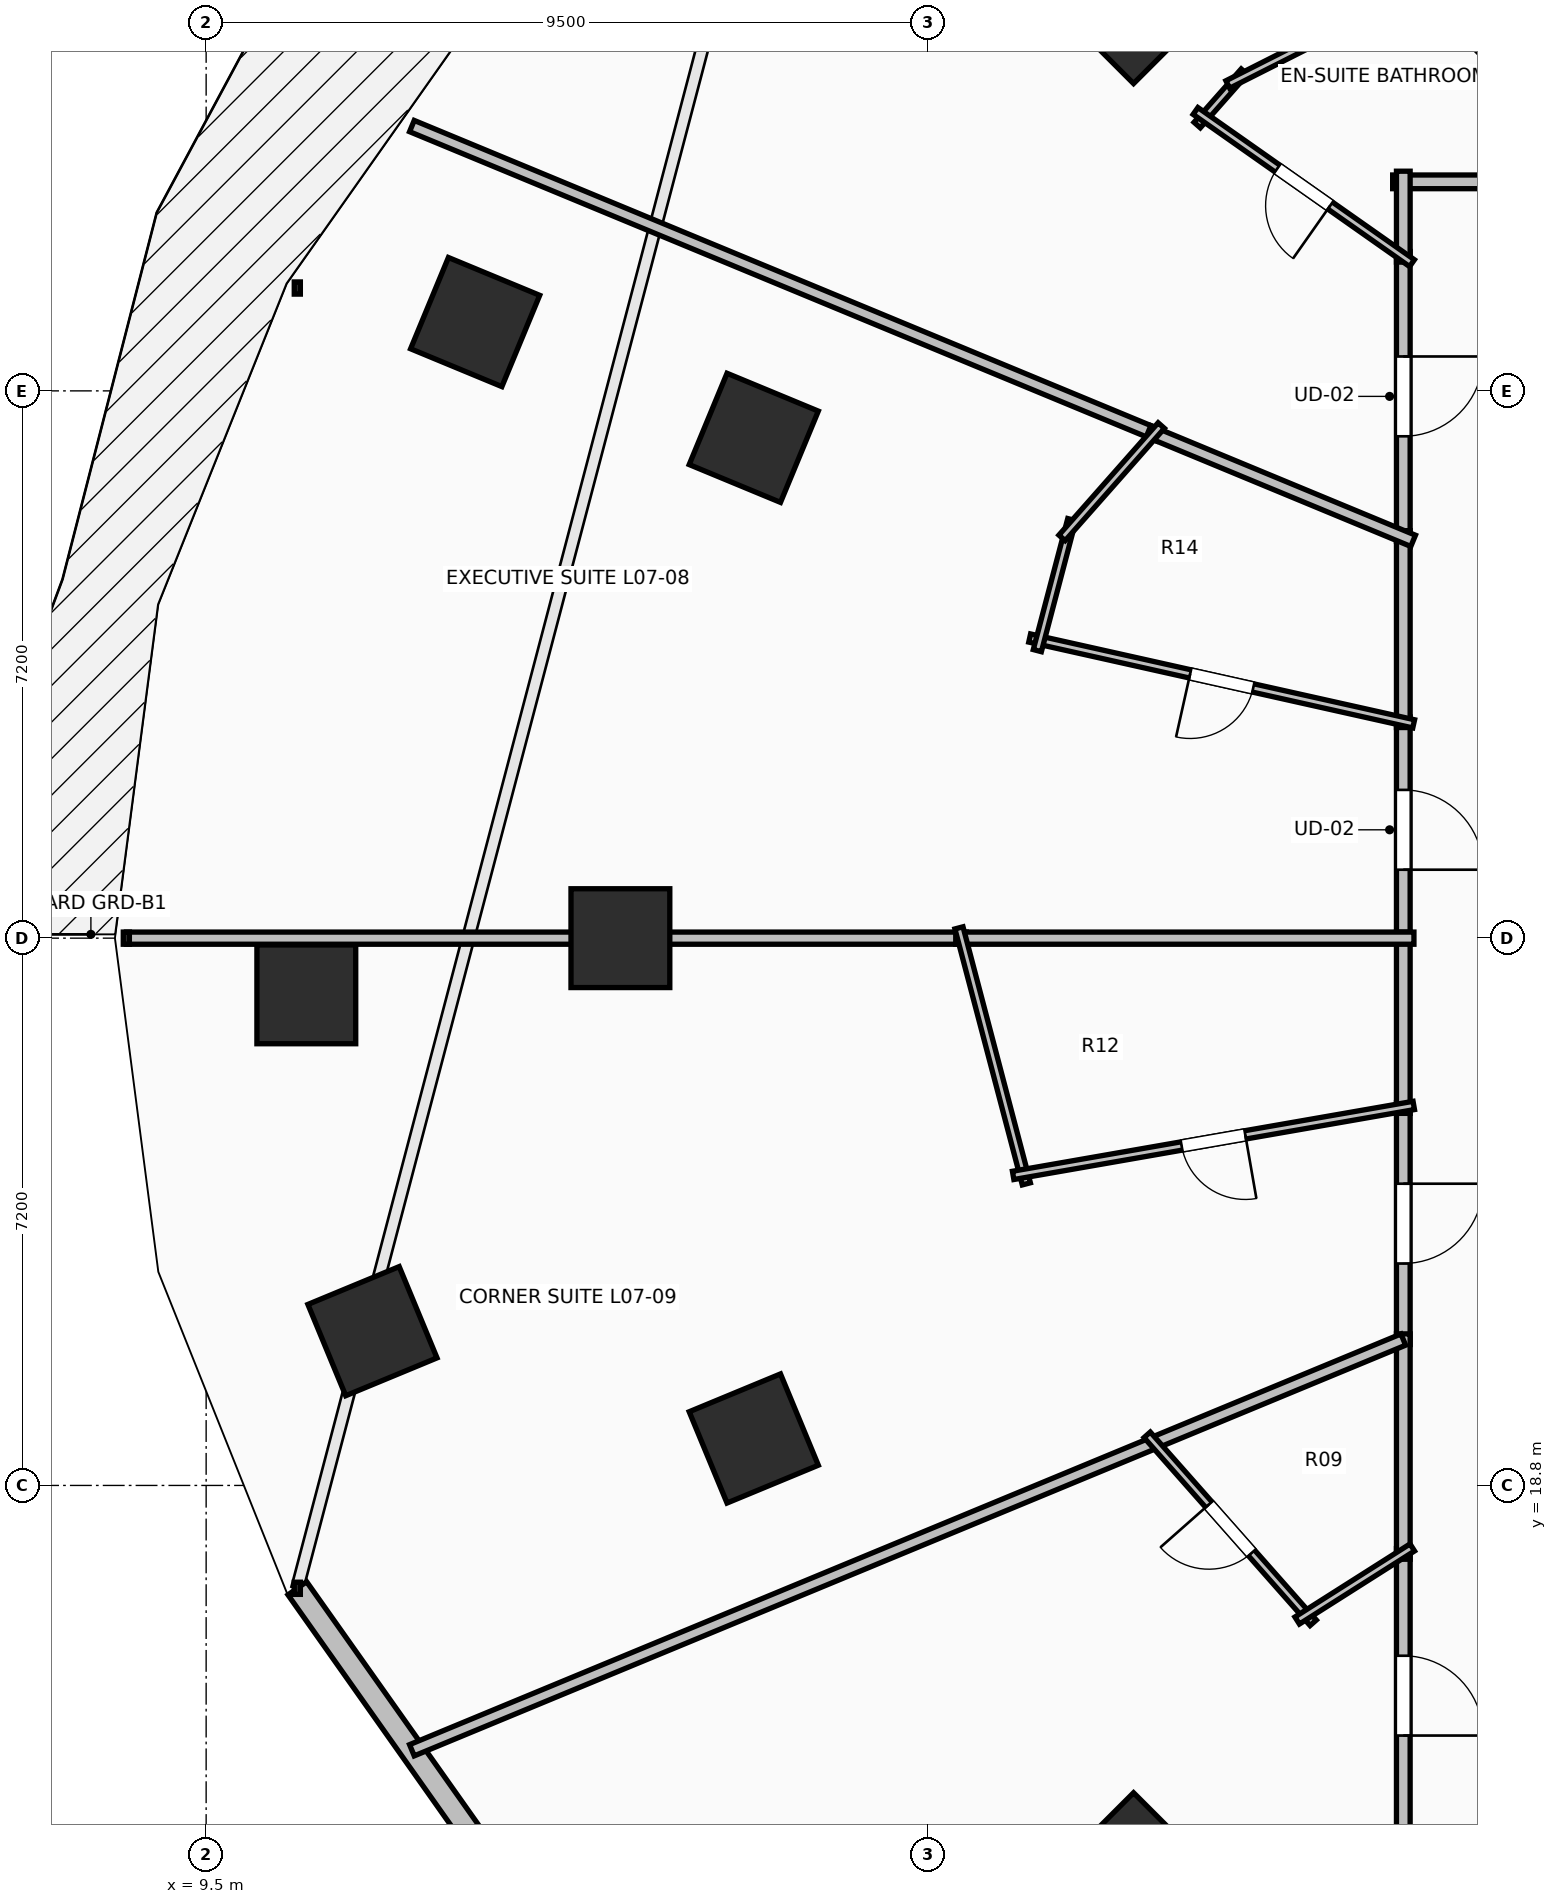
"""IFC4 building model, lengths in metres.
Left out: names, types, materials, properties, quantities, classifications, styles, units other than length and angle.
Written with IfcOpenShell. Run it as: python <this file> out.ifc"""

import sys

from ifc_helpers import new_model, si_unit, direction, frame, frame_2d, origin, origin_2d, place, context, subcontext, project, spatial, rectangle, extrude, element, fill, save


model = new_model("IFC4")
c1 = context("Model", 3, precision=1e-05, world=origin(), true_north=direction((0.0, 1.0)))
c2 = subcontext(c1, "Body", "Model", "MODEL_VIEW")
j1 = project(units=[si_unit("LENGTHUNIT", "METRE"), si_unit("PLANEANGLEUNIT", "RADIAN")], contexts=[c1])
p1 = place(None, origin())
s1 = spatial("IfcSite", under=j1, at=p1, CompositionType="ELEMENT")
p2 = place(p1, origin())
s2 = spatial("IfcBuilding", under=s1, at=p2, CompositionType="ELEMENT")
p3 = place(p2, frame((0.0, 0.0, 31.0)))
s3 = spatial("IfcBuildingStorey", under=s2, at=p3, CompositionType="ELEMENT", Elevation=31.0)
for number, where, z_axis, x_axis in (
    (1, (21.701, 38.162, 0.0), (0.0, 0.0, 1.0), (-0.707, 0.707, 0.0)),
    (2, (16.705, 32.582, 0.0), (0.0, 0.0, 1.0), (-0.924, 0.383, 0.0)),
    (3, (14.95, 26.0, 0.0), (0.0, 0.0, 1.0), (-1.0, 0.0, 0.0)),
    (4, (16.705, 19.418, 0.0), (0.0, 0.0, 1.0), (-0.924, -0.383, 0.0)),
    (5, (21.701, 13.838, 0.0), (0.0, 0.0, 1.0), (-0.707, -0.707, 0.0)),
    (6, (13.039, 34.105, 0.0), (0.0, 0.0, 1.0), (-0.924, 0.383, 0.0)),
    (7, (10.818, 25.261, 0.0), (0.0, 0.0, 1.0), (-1.0, 0.0, 0.0)),
    (8, (11.688, 20.83, 0.0), (0.0, 0.0, 1.0), (-0.924, -0.383, 0.0)),
):
    element("IfcColumn", number, at=place(p3, frame(where, z_axis=z_axis, x_axis=x_axis)), inside=s3, PredefinedType="COLUMN", context=c2, shape_type="SweptSolid", body=[
        extrude(rectangle(XDim=1.3, YDim=1.3, at=origin_2d()), origin(), (0.0, 0.0, 1.0), 3.5),
    ])
p4 = place(p3, frame((10.699, 17.447, 0.0), z_axis=(0.0, 0.0, 1.0), x_axis=(0.577130815624, -0.816651713803, 0.0)))
e9 = element("IfcWall", 9, at=p4, inside=s3, PredefinedType="STANDARD", context=c2, shape_type="SweptSolid", body=[
    extrude(rectangle(XDim=4.731, YDim=0.3, at=frame_2d((2.366, 0.0))), origin(), (0.0, 0.0, 1.0), 3.24),
])
p5 = place(p3, frame((25.25, 35.034, 0.0), z_axis=(0.0, 0.0, 1.0), x_axis=(0.0, -1.0, 0.0)))
e10 = element("IfcWall", 10, at=p5, inside=s3, PredefinedType="PARTITIONING", context=c2, shape_type="SweptSolid", body=[
    extrude(rectangle(XDim=3.813, YDim=0.18, at=frame_2d((1.906, 0.0))), origin(), (0.0, 0.0, 1.0), 2.432),
])
p6 = place(p5, frame((1.382, 0.0, 0.0)))
e11 = element("IfcOpeningElement", 11, at=p6, cuts=e10, PredefinedType="OPENING", context=c2, shape_type="SweptSolid", body=[
    extrude(rectangle(XDim=1.05, YDim=2.2, at=frame_2d((0.525, 1.1))), frame((0.0, 0.105, 0.0), z_axis=(0.0, -1.0, 0.0), x_axis=(1.0, 0.0, 0.0)), (0.0, 0.0, 1.0), 0.21),
])
p7 = place(p3, frame((28.105, 35.95, 0.0), z_axis=(0.0, 0.0, 1.0), x_axis=(-1.0, 0.0, 0.0)))
e12 = element("IfcWall", 12, at=p7, inside=s3, PredefinedType="PARTITIONING", context=c2, shape_type="SweptSolid", body=[
    extrude(rectangle(XDim=2.995, YDim=0.18, at=frame_2d((1.498, 0.0))), origin(), (0.0, 0.0, 1.0), 2.432),
])
p8 = place(p3, frame((25.25, 36.09, 0.0), z_axis=(0.0, 0.0, 1.0), x_axis=(0.0, -1.0, 0.0)))
e13 = element("IfcWall", 13, at=p8, inside=s3, PredefinedType="PARTITIONING", context=c2, shape_type="SweptSolid", body=[
    extrude(rectangle(XDim=1.196, YDim=0.18, at=frame_2d((0.598, 0.0))), origin(), (0.0, 0.0, 1.0), 2.432),
])
p9 = place(p3, frame((25.25, 28.911, 0.0), z_axis=(0.0, 0.0, 1.0), x_axis=(0.0, -1.0, 0.0)))
e14 = element("IfcWall", 14, at=p9, inside=s3, PredefinedType="PARTITIONING", context=c2, shape_type="SweptSolid", body=[
    extrude(rectangle(XDim=2.971, YDim=0.18, at=frame_2d((1.485, 0.0))), origin(), (0.0, 0.0, 1.0), 2.432),
])
p10 = place(p9, frame((0.96, 0.0, 0.0)))
e15 = element("IfcOpeningElement", 15, at=p10, cuts=e14, PredefinedType="OPENING", context=c2, shape_type="SweptSolid", body=[
    extrude(rectangle(XDim=1.05, YDim=2.2, at=frame_2d((0.525, 1.1))), frame((0.0, 0.105, 0.0), z_axis=(0.0, -1.0, 0.0), x_axis=(1.0, 0.0, 0.0)), (0.0, 0.0, 1.0), 0.21),
])
p11 = place(p3, frame((25.25, 31.361, 0.0), z_axis=(0.0, 0.0, 1.0), x_axis=(0.0, -1.0, 0.0)))
e16 = element("IfcWall", 16, at=p11, inside=s3, PredefinedType="PARTITIONING", context=c2, shape_type="SweptSolid", body=[
    extrude(rectangle(XDim=2.59, YDim=0.18, at=frame_2d((1.295, 0.0))), origin(), (0.0, 0.0, 1.0), 2.432),
])
p12 = place(p3, frame((25.25, 23.835, 0.0), z_axis=(0.0, 0.0, 1.0), x_axis=(0.0, -1.0, 0.0)))
e17 = element("IfcWall", 17, at=p12, inside=s3, PredefinedType="PARTITIONING", context=c2, shape_type="SweptSolid", body=[
    extrude(rectangle(XDim=3.181, YDim=0.18, at=frame_2d((1.59, 0.0))), origin(), (0.0, 0.0, 1.0), 3.24),
])
p13 = place(p12, frame((1.065, 0.0, 0.0)))
e18 = element("IfcOpeningElement", 18, at=p13, cuts=e17, PredefinedType="OPENING", context=c2, shape_type="SweptSolid", body=[
    extrude(rectangle(XDim=1.05, YDim=2.2, at=frame_2d((0.525, 1.1))), frame((0.0, 0.105, 0.0), z_axis=(0.0, -1.0, 0.0), x_axis=(1.0, 0.0, 0.0)), (0.0, 0.0, 1.0), 0.21),
])
p14 = place(p3, frame((25.25, 26.08, 0.0), z_axis=(0.0, 0.0, 1.0), x_axis=(0.0, -1.0, 0.0)))
e19 = element("IfcWall", 19, at=p14, inside=s3, PredefinedType="PARTITIONING", context=c2, shape_type="SweptSolid", body=[
    extrude(rectangle(XDim=2.385, YDim=0.18, at=frame_2d((1.192, 0.0))), origin(), (0.0, 0.0, 1.0), 3.24),
])
p15 = place(p3, frame((25.25, 17.969, 0.0), z_axis=(0.0, 0.0, 1.0), x_axis=(0.0, -1.0, 0.0)))
e20 = element("IfcWall", 20, at=p15, inside=s3, PredefinedType="PARTITIONING", context=c2, shape_type="SweptSolid", body=[
    extrude(rectangle(XDim=3.869, YDim=0.18, at=frame_2d((1.935, 0.0))), origin(), (0.0, 0.0, 1.0), 2.432),
])
p16 = place(p15, frame((1.409, 0.0, 0.0)))
e21 = element("IfcOpeningElement", 21, at=p16, cuts=e20, PredefinedType="OPENING", context=c2, shape_type="SweptSolid", body=[
    extrude(rectangle(XDim=1.05, YDim=2.2, at=frame_2d((0.525, 1.1))), frame((0.0, 0.105, 0.0), z_axis=(0.0, -1.0, 0.0), x_axis=(1.0, 0.0, 0.0)), (0.0, 0.0, 1.0), 0.21),
])
p17 = place(p3, frame((25.25, 20.794, 0.0), z_axis=(0.0, 0.0, 1.0), x_axis=(0.0, -1.0, 0.0)))
e22 = element("IfcWall", 22, at=p17, inside=s3, PredefinedType="PARTITIONING", context=c2, shape_type="SweptSolid", body=[
    extrude(rectangle(XDim=2.965, YDim=0.18, at=frame_2d((1.482, 0.0))), origin(), (0.0, 0.0, 1.0), 3.24),
])
p18 = place(p3, frame((20.247, 43.753, 0.0), z_axis=(0.0, 0.0, 1.0), x_axis=(0.707106781187, -0.707106781187, 0.0)))
e23 = element("IfcWall", 23, at=p18, inside=s3, PredefinedType="PARTITIONING", context=c2, shape_type="SweptSolid", body=[
    extrude(rectangle(XDim=11.035, YDim=0.16, at=frame_2d((5.518, 0.0))), origin(), (0.0, 0.0, 1.0), 2.432),
])
p19 = place(p3, frame((22.538, 36.697, 0.0), z_axis=(0.0, 0.0, 1.0), x_axis=(0.662242037053, 0.749289986827, 0.0)))
e24 = element("IfcWall", 24, at=p19, inside=s3, PredefinedType="PARTITIONING", context=c2, shape_type="SweptSolid", body=[
    extrude(rectangle(XDim=0.937, YDim=0.11, at=frame_2d((0.468, 0.0))), origin(), (0.0, 0.0, 1.0), 2.432),
])
p20 = place(p3, frame((22.941, 37.231, 0.0), z_axis=(0.0, 0.0, 1.0), x_axis=(0.892507731149, 0.451032094024, 0.0)))
e25 = element("IfcWall", 25, at=p20, inside=s3, PredefinedType="PARTITIONING", context=c2, shape_type="SweptSolid", body=[
    extrude(rectangle(XDim=2.989, YDim=0.11, at=frame_2d((1.495, 0.0))), origin(), (0.0, 0.0, 1.0), 2.432),
])
p21 = place(p3, frame((25.365, 34.881, 0.0), z_axis=(0.0, 0.0, 1.0), x_axis=(-0.81809360258, 0.575085087111, 0.0)))
e26 = element("IfcWall", 26, at=p21, inside=s3, PredefinedType="PARTITIONING", context=c2, shape_type="SweptSolid", body=[
    extrude(rectangle(XDim=3.481, YDim=0.11, at=frame_2d((1.741, 0.0))), origin(), (0.0, 0.0, 1.0), 2.432),
])
p22 = place(p21, frame((1.316, 0.0, 0.0)))
e27 = element("IfcOpeningElement", 27, at=p22, cuts=e26, PredefinedType="OPENING", context=c2, shape_type="SweptSolid", body=[
    extrude(rectangle(XDim=0.85, YDim=2.1, at=frame_2d((0.425, 1.05))), frame((0.0, 0.07, 0.0), z_axis=(0.0, -1.0, 0.0), x_axis=(1.0, 0.0, 0.0)), (0.0, 0.0, 1.0), 0.14),
])
p23 = place(p3, frame((12.207, 36.684, 0.0), z_axis=(0.0, 0.0, 1.0), x_axis=(0.923876032578, -0.382691881842, 0.0)))
e28 = element("IfcWall", 28, at=p23, inside=s3, PredefinedType="PARTITIONING", context=c2, shape_type="SweptSolid", body=[
    extrude(rectangle(XDim=10.63, YDim=0.16, at=frame_2d((5.315, 0.0))), origin(), (0.0, 0.0, 1.0), 2.624),
])
p24 = place(p3, frame((21.899, 32.669, 0.0), z_axis=(0.0, 0.0, 1.0), x_axis=(0.923843852071, -0.382769561211, 0.0)))
e29 = element("IfcWall", 29, at=p24, inside=s3, PredefinedType="PARTITIONING", context=c2, shape_type="SweptSolid", body=[
    extrude(rectangle(XDim=3.768, YDim=0.16, at=frame_2d((1.884, 0.0))), origin(), (0.0, 0.0, 1.0), 2.922),
])
p25 = place(p3, frame((25.387, 28.82, 0.0), z_axis=(0.0, 0.0, 1.0), x_axis=(-0.975933395621, 0.218068813248, 0.0)))
e30 = element("IfcWall", 30, at=p25, inside=s3, PredefinedType="PARTITIONING", context=c2, shape_type="SweptSolid", body=[
    extrude(rectangle(XDim=5.177, YDim=0.11, at=frame_2d((2.588, 0.0))), origin(), (0.0, 0.0, 1.0), 2.432),
])
p26 = place(p25, frame((2.163, 0.0, 0.0)))
e31 = element("IfcOpeningElement", 31, at=p26, cuts=e30, PredefinedType="OPENING", context=c2, shape_type="SweptSolid", body=[
    extrude(rectangle(XDim=0.85, YDim=2.1, at=frame_2d((0.425, 1.05))), frame((0.0, 0.07, 0.0), z_axis=(0.0, -1.0, 0.0), x_axis=(1.0, 0.0, 0.0)), (0.0, 0.0, 1.0), 0.14),
])
p27 = place(p3, frame((20.435, 29.783, 0.0), z_axis=(0.0, 0.0, 1.0), x_axis=(0.254378671262, 0.967104695267, 0.0)))
e32 = element("IfcWall", 32, at=p27, inside=s3, PredefinedType="PARTITIONING", context=c2, shape_type="SweptSolid", body=[
    extrude(rectangle(XDim=1.782, YDim=0.11, at=frame_2d((0.891, 0.0))), origin(), (0.0, 0.0, 1.0), 2.432),
])
p28 = place(p3, frame((20.76, 31.266, 0.0), z_axis=(0.0, 0.0, 1.0), x_axis=(0.662047420969, 0.749461948593, 0.0)))
e33 = element("IfcWall", 33, at=p28, inside=s3, PredefinedType="PARTITIONING", context=c2, shape_type="SweptSolid", body=[
    extrude(rectangle(XDim=1.972, YDim=0.11, at=frame_2d((0.986, 0.0))), origin(), (0.0, 0.0, 1.0), 3.24),
])
p29 = place(p3, frame((8.451, 26.0, 0.0), z_axis=(0.0, 0.0, 1.0), x_axis=(1.0, 0.0, 0.0)))
e34 = element("IfcWall", 34, at=p29, inside=s3, PredefinedType="PARTITIONING", context=c2, shape_type="SweptSolid", body=[
    extrude(rectangle(XDim=11.051, YDim=0.16, at=frame_2d((5.525, 0.0))), origin(), (0.0, 0.0, 1.0), 2.432),
])
p30 = place(p3, frame((19.362, 26.0, 0.0), z_axis=(0.0, 0.0, 1.0), x_axis=(1.0, 0.0, 0.0)))
e35 = element("IfcWall", 35, at=p30, inside=s3, PredefinedType="PARTITIONING", context=c2, shape_type="SweptSolid", body=[
    extrude(rectangle(XDim=6.028, YDim=0.16, at=frame_2d((3.014, 0.0))), origin(), (0.0, 0.0, 1.0), 2.922),
])
p31 = place(p3, frame((20.291, 22.768, 0.0), z_axis=(0.0, 0.0, 1.0), x_axis=(-0.254476045764, 0.967079077497, 0.0)))
e36 = element("IfcWall", 36, at=p31, inside=s3, PredefinedType="PARTITIONING", context=c2, shape_type="SweptSolid", body=[
    extrude(rectangle(XDim=3.483, YDim=0.11, at=frame_2d((1.741, 0.0))), origin(), (0.0, 0.0, 1.0), 3.24),
])
p32 = place(p3, frame((25.388, 23.799, 0.0), z_axis=(0.0, 0.0, 1.0), x_axis=(-0.985100697644, -0.171978532096, 0.0)))
e37 = element("IfcWall", 37, at=p32, inside=s3, PredefinedType="PARTITIONING", context=c2, shape_type="SweptSolid", body=[
    extrude(rectangle(XDim=5.351, YDim=0.11, at=frame_2d((2.675, 0.0))), origin(), (0.0, 0.0, 1.0), 2.922),
])
p33 = place(p32, frame((2.25, 0.0, 0.0)))
e38 = element("IfcOpeningElement", 38, at=p33, cuts=e37, PredefinedType="OPENING", context=c2, shape_type="SweptSolid", body=[
    extrude(rectangle(XDim=0.85, YDim=2.1, at=frame_2d((0.425, 1.05))), frame((0.0, 0.07, 0.0), z_axis=(0.0, -1.0, 0.0), x_axis=(1.0, 0.0, 0.0)), (0.0, 0.0, 1.0), 0.14),
])
p34 = place(p3, frame((12.207, 15.316, 0.0), z_axis=(0.0, 0.0, 1.0), x_axis=(0.923866969846, 0.382713759914, 0.0)))
e39 = element("IfcWall", 39, at=p34, inside=s3, PredefinedType="PARTITIONING", context=c2, shape_type="SweptSolid", body=[
    extrude(rectangle(XDim=14.118, YDim=0.16, at=frame_2d((7.059, 0.0))), origin(), (0.0, 0.0, 1.0), 2.432),
])
p35 = place(p3, frame((24.065, 16.993, 0.0), z_axis=(0.0, 0.0, 1.0), x_axis=(-0.662059609276, 0.749451181709, 0.0)))
e40 = element("IfcWall", 40, at=p35, inside=s3, PredefinedType="PARTITIONING", context=c2, shape_type="SweptSolid", body=[
    extrude(rectangle(XDim=3.299, YDim=0.11, at=frame_2d((1.65, 0.0))), origin(), (0.0, 0.0, 1.0), 2.432),
])
p36 = place(p35, frame((1.225, 0.0, 0.0)))
e41 = element("IfcOpeningElement", 41, at=p36, cuts=e40, PredefinedType="OPENING", context=c2, shape_type="SweptSolid", body=[
    extrude(rectangle(XDim=0.85, YDim=2.1, at=frame_2d((0.425, 1.05))), frame((0.0, 0.07, 0.0), z_axis=(0.0, -1.0, 0.0), x_axis=(1.0, 0.0, 0.0)), (0.0, 0.0, 1.0), 0.14),
])
p37 = place(p3, frame((25.368, 17.984, 0.0), z_axis=(0.0, 0.0, 1.0), x_axis=(-0.844361394482, -0.535774052665, 0.0)))
e42 = element("IfcWall", 42, at=p37, inside=s3, PredefinedType="PARTITIONING", context=c2, shape_type="SweptSolid", body=[
    extrude(rectangle(XDim=1.793, YDim=0.11, at=frame_2d((0.897, 0.0))), origin(), (0.0, 0.0, 1.0), 2.432),
])
p38 = place(p6, origin())
e43 = element("IfcDoor", 43, at=p38, inside=s3, OperationType="SINGLE_SWING_LEFT", PredefinedType="DOOR", context=c2, shape_type="SweptSolid", body=[
    extrude(rectangle(XDim=1.05, YDim=2.2, at=frame_2d((0.525, 1.1))), frame((0.0, 0.025, 0.0), z_axis=(0.0, -1.0, 0.0), x_axis=(1.0, 0.0, 0.0)), (0.0, 0.0, 1.0), 0.05),
])
fill(e11, e43)
p39 = place(p10, origin())
e44 = element("IfcDoor", 44, at=p39, inside=s3, OperationType="SINGLE_SWING_RIGHT", PredefinedType="DOOR", context=c2, shape_type="SweptSolid", body=[
    extrude(rectangle(XDim=1.05, YDim=2.2, at=frame_2d((0.525, 1.1))), frame((0.0, 0.025, 0.0), z_axis=(0.0, -1.0, 0.0), x_axis=(1.0, 0.0, 0.0)), (0.0, 0.0, 1.0), 0.05),
])
fill(e15, e44)
p40 = place(p13, origin())
e45 = element("IfcDoor", 45, at=p40, inside=s3, OperationType="SINGLE_SWING_LEFT", PredefinedType="DOOR", context=c2, shape_type="SweptSolid", body=[
    extrude(rectangle(XDim=1.05, YDim=2.2, at=frame_2d((0.525, 1.1))), frame((0.0, 0.025, 0.0), z_axis=(0.0, -1.0, 0.0), x_axis=(1.0, 0.0, 0.0)), (0.0, 0.0, 1.0), 0.05),
])
fill(e18, e45)
p41 = place(p16, origin())
e46 = element("IfcDoor", 46, at=p41, inside=s3, OperationType="SINGLE_SWING_RIGHT", PredefinedType="DOOR", context=c2, shape_type="SweptSolid", body=[
    extrude(rectangle(XDim=1.05, YDim=2.2, at=frame_2d((0.525, 1.1))), frame((0.0, 0.025, 0.0), z_axis=(0.0, -1.0, 0.0), x_axis=(1.0, 0.0, 0.0)), (0.0, 0.0, 1.0), 0.05),
])
fill(e21, e46)
p42 = place(p22, origin())
e47 = element("IfcDoor", 47, at=p42, inside=s3, OperationType="SINGLE_SWING_LEFT", PredefinedType="DOOR", context=c2, shape_type="SweptSolid", body=[
    extrude(rectangle(XDim=0.85, YDim=2.1, at=frame_2d((0.425, 1.05))), frame((0.0, 0.025, 0.0), z_axis=(0.0, -1.0, 0.0), x_axis=(1.0, 0.0, 0.0)), (0.0, 0.0, 1.0), 0.05),
])
fill(e27, e47)
p43 = place(p26, origin())
e48 = element("IfcDoor", 48, at=p43, inside=s3, OperationType="SINGLE_SWING_RIGHT", PredefinedType="DOOR", context=c2, shape_type="SweptSolid", body=[
    extrude(rectangle(XDim=0.85, YDim=2.1, at=frame_2d((0.425, 1.05))), frame((0.0, 0.025, 0.0), z_axis=(0.0, -1.0, 0.0), x_axis=(1.0, 0.0, 0.0)), (0.0, 0.0, 1.0), 0.05),
])
fill(e31, e48)
p44 = place(p33, origin())
e49 = element("IfcDoor", 49, at=p44, inside=s3, OperationType="SINGLE_SWING_LEFT", PredefinedType="DOOR", context=c2, shape_type="SweptSolid", body=[
    extrude(rectangle(XDim=0.85, YDim=2.1, at=frame_2d((0.425, 1.05))), frame((0.0, 0.025, 0.0), z_axis=(0.0, -1.0, 0.0), x_axis=(1.0, 0.0, 0.0)), (0.0, 0.0, 1.0), 0.05),
])
fill(e38, e49)
p45 = place(p36, origin())
e50 = element("IfcDoor", 50, at=p45, inside=s3, OperationType="SINGLE_SWING_RIGHT", PredefinedType="DOOR", context=c2, shape_type="SweptSolid", body=[
    extrude(rectangle(XDim=0.85, YDim=2.1, at=frame_2d((0.425, 1.05))), frame((0.0, 0.025, 0.0), z_axis=(0.0, -1.0, 0.0), x_axis=(1.0, 0.0, 0.0)), (0.0, 0.0, 1.0), 0.05),
])
fill(e41, e50)
save(model, sys.argv[1])
